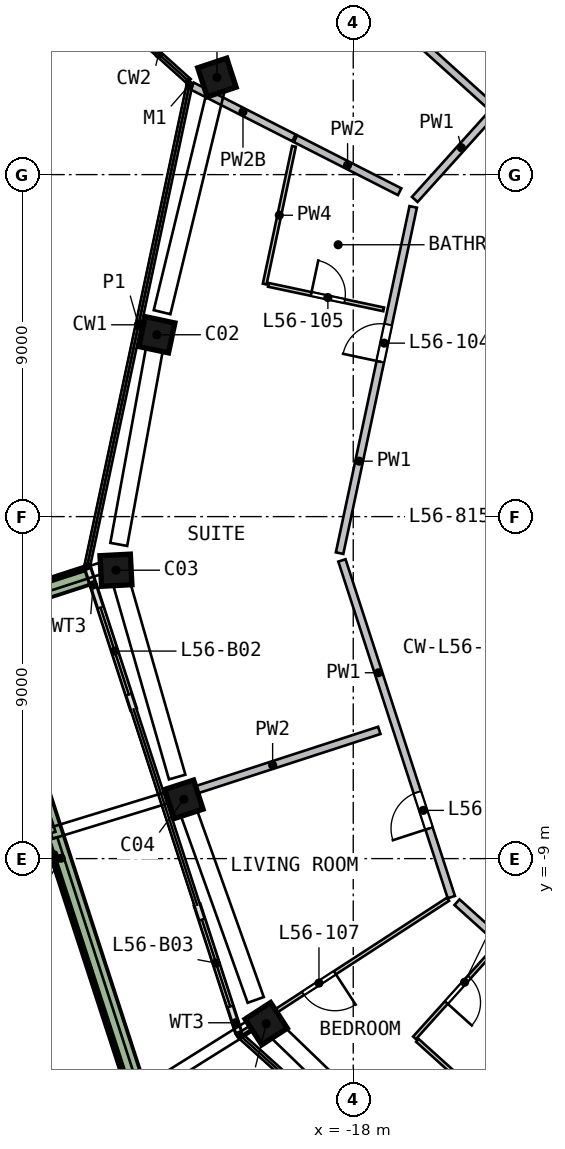
"""IFC4 building model, lengths in metres.
Left out: names, types, materials, properties, quantities, classifications, styles, units other than length and angle.
Written with IfcOpenShell. Run it as: python <this file> out.ifc"""

import sys

from ifc_helpers import new_model, si_unit, direction, frame, frame_2d, origin, origin_2d, place, context, subcontext, project, spatial, rectangle, extrude, element, fill, save


model = new_model("IFC4")
c1 = context("Model", 3, precision=1e-05, world=origin(), true_north=direction((0.0, 1.0)))
c2 = subcontext(c1, "Body", "Model", "MODEL_VIEW")
j1 = project(units=[si_unit("LENGTHUNIT", "METRE"), si_unit("PLANEANGLEUNIT", "RADIAN")], contexts=[c1])
p1 = place(None, origin())
s1 = spatial("IfcSite", under=j1, at=p1, CompositionType="ELEMENT")
p2 = place(p1, origin())
s2 = spatial("IfcBuilding", under=s1, at=p2, CompositionType="ELEMENT")
p3 = place(p2, frame((0.0, 0.0, 230.5)))
s3 = spatial("IfcBuildingStorey", under=s2, at=p3, CompositionType="ELEMENT", Elevation=230.5)
p4 = place(p3, frame((-21.52, 11.68, 0.0), z_axis=(-0.054654256, -0.102771286, 0.993202384), x_axis=(-0.314567755, 0.945810578, 0.0805573)))
e1 = element("IfcColumn", 1, at=p4, inside=s3, PredefinedType="COLUMN", context=c2, shape_type="SweptSolid", body=[
    extrude(rectangle(XDim=0.8, YDim=0.8, at=origin_2d()), origin(), (0.0, 0.0, 1.0), 3.212),
])
p5 = place(p3, frame((-23.141, 4.919, 0.0), z_axis=(-0.022434279, -0.110270183, 0.993648424), x_axis=(-0.206353156, -0.971985836, -0.112525153)))
e2 = element("IfcColumn", 2, at=p5, inside=s3, PredefinedType="COLUMN", context=c2, shape_type="SweptSolid", body=[
    extrude(rectangle(XDim=0.8, YDim=0.8, at=origin_2d()), origin(), (0.0, 0.0, 1.0), 3.21),
])
p6 = place(p3, frame((-24.253, -1.271, 0.0), z_axis=(0.007070102, -0.115250266, 0.993311326), x_axis=(-0.052401319, 0.991928647, 0.115462816)))
e3 = element("IfcColumn", 3, at=p6, inside=s3, PredefinedType="COLUMN", context=c2, shape_type="SweptSolid", body=[
    extrude(rectangle(XDim=0.8, YDim=0.8, at=origin_2d()), origin(), (0.0, 0.0, 1.0), 3.211),
])
p7 = place(p3, frame((-22.5, -7.311, 0.0), z_axis=(0.03566653, -0.106771447, 0.993643677), x_axis=(0.306813406, -0.945089515, -0.112567057)))
e4 = element("IfcColumn", 4, at=p7, inside=s3, PredefinedType="COLUMN", context=c2, shape_type="SweptSolid", body=[
    extrude(rectangle(XDim=0.8, YDim=0.8, at=origin_2d()), origin(), (0.0, 0.0, 1.0), 3.21),
])
p8 = place(p3, frame((-20.368, -13.227, 0.0), z_axis=(0.063782539, -0.096319996, 0.99330471), x_axis=(-0.541368375, 0.83281179, 0.115519716)))
e5 = element("IfcColumn", 5, at=p8, inside=s3, PredefinedType="COLUMN", context=c2, shape_type="SweptSolid", body=[
    extrude(rectangle(XDim=0.8, YDim=0.8, at=origin_2d()), origin(), (0.0, 0.0, 1.0), 3.211),
])
p9 = place(p3, frame((-24.977, -1.386, 0.0), z_axis=(0.0, 0.0, 1.0), x_axis=(0.308976036, -0.951069823, 0.0)))
e6 = element("IfcWall", 6, at=p9, inside=s3, PredefinedType="SOLIDWALL", context=c2, shape_type="SweptSolid", body=[
    extrude(rectangle(XDim=3.863, YDim=0.15, at=frame_2d((1.932, 0.0))), origin(), (0.0, 0.0, 1.0), 2.525),
])
p10 = place(p9, frame((1.063, 0.0, 0.0)))
e7 = element("IfcOpeningElement", 7, at=p10, cuts=e6, PredefinedType="OPENING", context=c2, shape_type="SweptSolid", body=[
    extrude(rectangle(XDim=2.4, YDim=2.4, at=frame_2d((1.2, 1.2))), frame((0.0, 0.085, 0.0), z_axis=(0.0, -1.0, 0.0), x_axis=(1.0, 0.0, 0.0)), (0.0, 0.0, 1.0), 0.17),
])
p11 = place(p3, frame((-22.105, -10.227, 0.0), z_axis=(0.0, 0.0, 1.0), x_axis=(0.309070318, -0.951039189, 0.0)))
e8 = element("IfcWall", 8, at=p11, inside=s3, PredefinedType="SOLIDWALL", context=c2, shape_type="SweptSolid", body=[
    extrude(rectangle(XDim=3.504, YDim=0.15, at=frame_2d((1.752, 0.0))), origin(), (0.0, 0.0, 1.0), 2.525),
])
p12 = place(p11, frame((0.4, 0.0, 0.0)))
e9 = element("IfcOpeningElement", 9, at=p12, cuts=e8, PredefinedType="OPENING", context=c2, shape_type="SweptSolid", body=[
    extrude(rectangle(XDim=2.4, YDim=2.4, at=frame_2d((1.2, 1.2))), frame((0.0, 0.085, 0.0), z_axis=(0.0, -1.0, 0.0), x_axis=(1.0, 0.0, 0.0)), (0.0, 0.0, 1.0), 0.17),
])
p13 = place(p3, frame((-25.003, -1.552, 0.0), z_axis=(0.0, 0.0, 1.0), x_axis=(-0.951059864, -0.309006691, 0.0)))
e10 = element("IfcWall", 10, at=p13, inside=s3, PredefinedType="SOLIDWALL", context=c2, shape_type="SweptSolid", body=[
    extrude(rectangle(XDim=3.199, YDim=0.5, at=frame_2d((1.6, 0.0))), origin(), (0.0, 0.0, 1.0), 0.7),
])
p14 = place(p3, frame((-27.731, -2.701, 0.0), z_axis=(0.0, 0.0, 1.0), x_axis=(0.30900717, -0.951059708, 0.0)))
e11 = element("IfcWall", 11, at=p14, inside=s3, PredefinedType="SOLIDWALL", context=c2, shape_type="SweptSolid", body=[
    extrude(rectangle(XDim=13.224, YDim=0.5, at=frame_2d((6.612, 0.0))), origin(), (0.0, 0.0, 1.0), 0.7),
])
p15 = place(p3, frame((-18.36, -0.962, 0.0), z_axis=(0.0, 0.0, 1.0), x_axis=(0.207919873, 0.978145861, 0.0)))
e12 = element("IfcWall", 12, at=p15, inside=s3, PredefinedType="SOLIDWALL", context=c2, shape_type="SweptSolid", body=[
    extrude(rectangle(XDim=9.316, YDim=0.2, at=frame_2d((4.658, 0.0))), origin(), (0.0, 0.0, 1.0), 3.19),
])
p16 = place(p15, frame((5.15, 0.0, 0.0)))
e13 = element("IfcOpeningElement", 13, at=p16, cuts=e12, PredefinedType="OPENING", context=c2, shape_type="SweptSolid", body=[
    extrude(rectangle(XDim=1.0, YDim=2.1, at=frame_2d((0.5, 1.05))), frame((0.0, 0.11, 0.0), z_axis=(0.0, -1.0, 0.0), x_axis=(1.0, 0.0, 0.0)), (0.0, 0.0, 1.0), 0.22),
])
p17 = place(p3, frame((-15.419, -10.013, 0.0), z_axis=(0.0, 0.0, 1.0), x_axis=(-0.309017335, 0.951056406, 0.0)))
e14 = element("IfcWall", 14, at=p17, inside=s3, PredefinedType="SOLIDWALL", context=c2, shape_type="SweptSolid", body=[
    extrude(rectangle(XDim=9.316, YDim=0.2, at=frame_2d((4.658, 0.0))), origin(), (0.0, 0.0, 1.0), 3.19),
])
p18 = place(p17, frame((1.9, 0.0, 0.0)))
e15 = element("IfcOpeningElement", 15, at=p18, cuts=e14, PredefinedType="OPENING", context=c2, shape_type="SweptSolid", body=[
    extrude(rectangle(XDim=1.0, YDim=2.1, at=frame_2d((0.5, 1.05))), frame((0.0, 0.11, 0.0), z_axis=(0.0, -1.0, 0.0), x_axis=(1.0, 0.0, 0.0)), (0.0, 0.0, 1.0), 0.22),
])
p19 = place(p3, frame((-16.381, 8.346, 0.0), z_axis=(0.0, 0.0, 1.0), x_axis=(0.669131961, 0.743143605, 0.0)))
e16 = element("IfcWall", 16, at=p19, inside=s3, PredefinedType="SOLIDWALL", context=c2, shape_type="SweptSolid", body=[
    extrude(rectangle(XDim=9.517, YDim=0.2, at=frame_2d((4.758, 0.0))), origin(), (0.0, 0.0, 1.0), 3.19),
])
p20 = place(p19, frame((3.863, 0.0, 0.0)))
e17 = element("IfcOpeningElement", 17, at=p20, cuts=e16, PredefinedType="OPENING", context=c2, shape_type="SweptSolid", body=[
    extrude(rectangle(XDim=1.8, YDim=2.1, at=frame_2d((0.9, 1.05))), frame((0.0, 0.11, 0.0), z_axis=(0.0, -1.0, 0.0), x_axis=(1.0, 0.0, 0.0)), (0.0, 0.0, 1.0), 0.22),
])
p21 = place(p3, frame((-8.495, -16.247, 0.0), z_axis=(0.0, 0.0, 1.0), x_axis=(-0.743147652, 0.669127468, 0.0)))
e18 = element("IfcWall", 18, at=p21, inside=s3, PredefinedType="SOLIDWALL", context=c2, shape_type="SweptSolid", body=[
    extrude(rectangle(XDim=9.116, YDim=0.2, at=frame_2d((4.558, 0.0))), origin(), (0.0, 0.0, 1.0), 3.19),
])
p22 = place(p21, frame((3.05, 0.0, 0.0)))
e19 = element("IfcOpeningElement", 19, at=p22, cuts=e18, PredefinedType="OPENING", context=c2, shape_type="SweptSolid", body=[
    extrude(rectangle(XDim=1.0, YDim=2.1, at=frame_2d((0.5, 1.05))), frame((0.0, 0.11, 0.0), z_axis=(0.0, -1.0, 0.0), x_axis=(1.0, 0.0, 0.0)), (0.0, 0.0, 1.0), 0.22),
])
p23 = place(p3, frame((-19.56, 9.966, 0.0), z_axis=(0.0, 0.0, 1.0), x_axis=(-0.891012893, 0.453978, 0.0)))
e20 = element("IfcWall", 20, at=p23, inside=s3, PredefinedType="SOLIDWALL", context=c2, shape_type="SweptSolid", body=[
    extrude(rectangle(XDim=3.011, YDim=0.2, at=frame_2d((1.506, 0.0))), origin(), (0.0, 0.0, 1.0), 2.69),
])
p24 = place(p3, frame((-17.314, -5.626, 0.0), z_axis=(0.0, 0.0, 1.0), x_axis=(-0.951046834, -0.309046792, 0.0)))
e21 = element("IfcWall", 21, at=p24, inside=s3, PredefinedType="SOLIDWALL", context=c2, shape_type="SweptSolid", body=[
    extrude(rectangle(XDim=5.903, YDim=0.2, at=frame_2d((2.951, 0.0))), origin(), (0.0, 0.0, 1.0), 3.19),
])
p25 = place(p3, frame((-14.414, 10.831, 0.0), z_axis=(0.0, 0.0, 1.0), x_axis=(-0.743141846, 0.669133915, 0.0)))
e22 = element("IfcWall", 22, at=p25, inside=s3, PredefinedType="SOLIDWALL", context=c2, shape_type="SweptSolid", body=[
    extrude(rectangle(XDim=12.038, YDim=0.2, at=frame_2d((6.019, 0.0))), origin(), (0.0, 0.0, 1.0), 3.19),
])
p26 = place(p25, frame((3.65, 0.0, 0.0)))
e23 = element("IfcOpeningElement", 23, at=p26, cuts=e22, PredefinedType="OPENING", context=c2, shape_type="SweptSolid", body=[
    extrude(rectangle(XDim=1.0, YDim=2.1, at=frame_2d((0.5, 1.05))), frame((0.0, 0.11, 0.0), z_axis=(0.0, -1.0, 0.0), x_axis=(1.0, 0.0, 0.0)), (0.0, 0.0, 1.0), 0.22),
])
p27 = place(p3, frame((-16.779, 8.55, 0.0), z_axis=(0.0, 0.0, 1.0), x_axis=(-0.891035255, 0.453934107, 0.0)))
e24 = element("IfcWall", 24, at=p27, inside=s3, PredefinedType="SOLIDWALL", context=c2, shape_type="SweptSolid", body=[
    extrude(rectangle(XDim=3.075, YDim=0.2, at=frame_2d((1.537, 0.0))), origin(), (0.0, 0.0, 1.0), 3.19),
])
p28 = place(p3, frame((-20.33, 6.119, 0.0), z_axis=(0.0, 0.0, 1.0), x_axis=(0.207890288, 0.97815215, 0.0)))
e25 = element("IfcWall", 25, at=p28, inside=s3, PredefinedType="PARTITIONING", context=c2, shape_type="SweptSolid", body=[
    extrude(rectangle(XDim=3.704, YDim=0.1, at=frame_2d((1.852, 0.0))), origin(), (0.0, 0.0, 1.0), 3.19),
])
p29 = place(p3, frame((-20.233, 6.098, 0.0), z_axis=(0.0, 0.0, 1.0), x_axis=(0.978150244, -0.207899255, 0.0)))
e26 = element("IfcWall", 26, at=p29, inside=s3, PredefinedType="PARTITIONING", context=c2, shape_type="SweptSolid", body=[
    extrude(rectangle(XDim=3.1, YDim=0.1, at=frame_2d((1.55, 0.0))), origin(), (0.0, 0.0, 1.0), 3.19),
])
p30 = place(p29, frame((1.15, 0.0, 0.0)))
e27 = element("IfcOpeningElement", 27, at=p30, cuts=e26, PredefinedType="OPENING", context=c2, shape_type="SweptSolid", body=[
    extrude(rectangle(XDim=0.9, YDim=2.1, at=frame_2d((0.45, 1.05))), frame((0.0, 0.06, 0.0), z_axis=(0.0, -1.0, 0.0), x_axis=(1.0, 0.0, 0.0)), (0.0, 0.0, 1.0), 0.12),
])
p31 = place(p3, frame((-15.506, -10.07, 0.0), z_axis=(0.0, 0.0, 1.0), x_axis=(-0.838671806, -0.544637128, 0.0)))
e28 = element("IfcWall", 28, at=p31, inside=s3, PredefinedType="PARTITIONING", context=c2, shape_type="SweptSolid", body=[
    extrude(rectangle(XDim=6.476, YDim=0.1, at=frame_2d((3.238, 0.0))), origin(), (0.0, 0.0, 1.0), 3.19),
])
p32 = place(p31, frame((3.55, 0.0, 0.0)))
e29 = element("IfcOpeningElement", 29, at=p32, cuts=e28, PredefinedType="OPENING", context=c2, shape_type="SweptSolid", body=[
    extrude(rectangle(XDim=1.0, YDim=2.1, at=frame_2d((0.5, 1.05))), frame((0.0, 0.06, 0.0), z_axis=(0.0, -1.0, 0.0), x_axis=(1.0, 0.0, 0.0)), (0.0, 0.0, 1.0), 0.12),
])
p33 = place(p3, frame((-14.246, -11.338, 0.0), z_axis=(0.0, 0.0, 1.0), x_axis=(-0.669137525, -0.743138596, 0.0)))
e30 = element("IfcWall", 30, at=p33, inside=s3, PredefinedType="PARTITIONING", context=c2, shape_type="SweptSolid", body=[
    extrude(rectangle(XDim=3.2, YDim=0.1, at=frame_2d((1.6, 0.0))), origin(), (0.0, 0.0, 1.0), 3.19),
])
p34 = place(p33, frame((1.05, 0.0, 0.0)))
e31 = element("IfcOpeningElement", 31, at=p34, cuts=e30, PredefinedType="OPENING", context=c2, shape_type="SweptSolid", body=[
    extrude(rectangle(XDim=0.9, YDim=2.1, at=frame_2d((0.45, 1.05))), frame((0.0, 0.06, 0.0), z_axis=(0.0, -1.0, 0.0), x_axis=(1.0, 0.0, 0.0)), (0.0, 0.0, 1.0), 0.12),
])
p35 = place(p3, frame((-16.313, -13.783, 0.0), z_axis=(0.0, 0.0, 1.0), x_axis=(0.743123261, -0.669154555, 0.0)))
e32 = element("IfcWall", 32, at=p35, inside=s3, PredefinedType="PARTITIONING", context=c2, shape_type="SweptSolid", body=[
    extrude(rectangle(XDim=2.7, YDim=0.1, at=frame_2d((1.35, 0.0))), origin(), (0.0, 0.0, 1.0), 3.19),
])
p36 = place(p10, origin())
e33 = element("IfcDoor", 33, at=p36, inside=s3, OperationType="SLIDING_TO_LEFT", PredefinedType="DOOR", context=c2, shape_type="SweptSolid", body=[
    extrude(rectangle(XDim=2.4, YDim=2.4, at=frame_2d((1.2, 1.2))), frame((0.0, 0.025, 0.0), z_axis=(0.0, -1.0, 0.0), x_axis=(1.0, 0.0, 0.0)), (0.0, 0.0, 1.0), 0.05),
])
fill(e7, e33)
p37 = place(p12, origin())
e34 = element("IfcDoor", 34, at=p37, inside=s3, OperationType="SLIDING_TO_RIGHT", PredefinedType="DOOR", context=c2, shape_type="SweptSolid", body=[
    extrude(rectangle(XDim=2.4, YDim=2.4, at=frame_2d((1.2, 1.2))), frame((0.0, 0.025, 0.0), z_axis=(0.0, -1.0, 0.0), x_axis=(1.0, 0.0, 0.0)), (0.0, 0.0, 1.0), 0.05),
])
fill(e9, e34)
p38 = place(p16, origin())
e35 = element("IfcDoor", 35, at=p38, inside=s3, OperationType="SINGLE_SWING_LEFT", PredefinedType="DOOR", context=c2, shape_type="SweptSolid", body=[
    extrude(rectangle(XDim=1.0, YDim=2.1, at=frame_2d((0.5, 1.05))), frame((0.0, 0.025, 0.0), z_axis=(0.0, -1.0, 0.0), x_axis=(1.0, 0.0, 0.0)), (0.0, 0.0, 1.0), 0.05),
])
fill(e13, e35)
p39 = place(p30, origin())
e36 = element("IfcDoor", 36, at=p39, inside=s3, OperationType="SINGLE_SWING_LEFT", PredefinedType="DOOR", context=c2, shape_type="SweptSolid", body=[
    extrude(rectangle(XDim=0.9, YDim=2.1, at=frame_2d((0.45, 1.05))), frame((0.0, 0.025, 0.0), z_axis=(0.0, -1.0, 0.0), x_axis=(1.0, 0.0, 0.0)), (0.0, 0.0, 1.0), 0.05),
])
fill(e27, e36)
p40 = place(p18, origin())
e37 = element("IfcDoor", 37, at=p40, inside=s3, OperationType="SINGLE_SWING_LEFT", PredefinedType="DOOR", context=c2, shape_type="SweptSolid", body=[
    extrude(rectangle(XDim=1.0, YDim=2.1, at=frame_2d((0.5, 1.05))), frame((0.0, 0.025, 0.0), z_axis=(0.0, -1.0, 0.0), x_axis=(1.0, 0.0, 0.0)), (0.0, 0.0, 1.0), 0.05),
])
fill(e15, e37)
p41 = place(p32, origin())
e38 = element("IfcDoor", 38, at=p41, inside=s3, OperationType="SINGLE_SWING_LEFT", PredefinedType="DOOR", context=c2, shape_type="SweptSolid", body=[
    extrude(rectangle(XDim=1.0, YDim=2.1, at=frame_2d((0.5, 1.05))), frame((0.0, 0.025, 0.0), z_axis=(0.0, -1.0, 0.0), x_axis=(1.0, 0.0, 0.0)), (0.0, 0.0, 1.0), 0.05),
])
fill(e29, e38)
p42 = place(p34, origin())
e39 = element("IfcDoor", 39, at=p42, inside=s3, OperationType="SINGLE_SWING_RIGHT", PredefinedType="DOOR", context=c2, shape_type="SweptSolid", body=[
    extrude(rectangle(XDim=0.9, YDim=2.1, at=frame_2d((0.45, 1.05))), frame((0.0, 0.025, 0.0), z_axis=(0.0, -1.0, 0.0), x_axis=(1.0, 0.0, 0.0)), (0.0, 0.0, 1.0), 0.05),
])
fill(e31, e39)
save(model, sys.argv[1])
